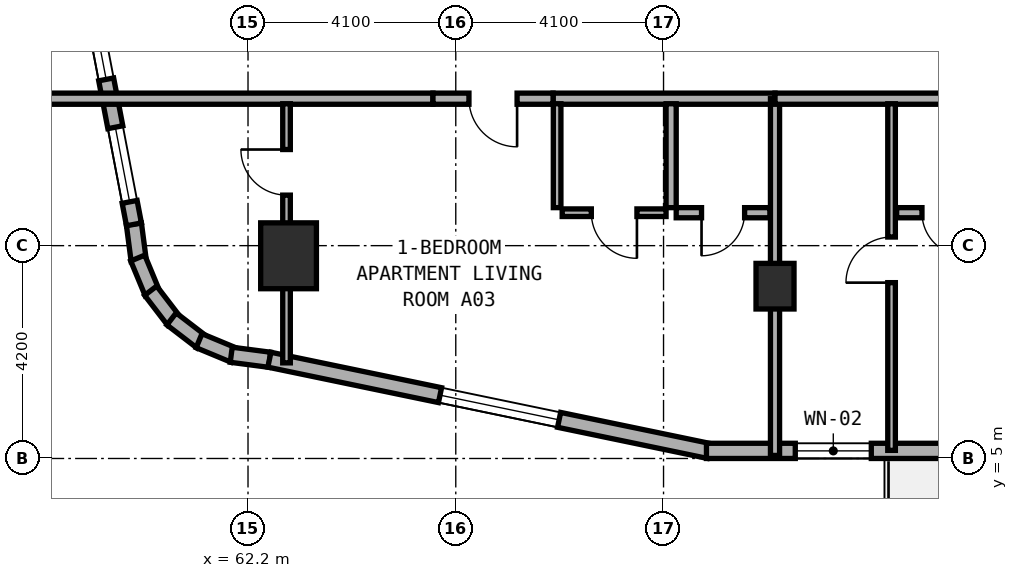
"""IFC4 building model, lengths in metres.
Left out: names, types, materials, properties, quantities, classifications, styles, units other than length and angle.
Written with IfcOpenShell. Run it as: python <this file> out.ifc"""

import sys

from ifc_helpers import new_model, si_unit, direction, frame, frame_2d, origin, origin_2d, place, context, subcontext, project, spatial, rectangle, extrude, element, fill, save


model = new_model("IFC4")
c1 = context("Model", 3, precision=1e-05, world=origin(), true_north=direction((0.0, 1.0)))
c2 = subcontext(c1, "Body", "Model", "MODEL_VIEW")
j1 = project(units=[si_unit("LENGTHUNIT", "METRE"), si_unit("PLANEANGLEUNIT", "RADIAN")], contexts=[c1])
p1 = place(None, origin())
s1 = spatial("IfcSite", under=j1, at=p1, CompositionType="ELEMENT")
p2 = place(p1, origin())
s2 = spatial("IfcBuilding", under=s1, at=p2, CompositionType="ELEMENT")
p3 = place(p2, frame((0.0, 0.0, 27.5)))
s3 = spatial("IfcBuildingStorey", under=s2, at=p3, CompositionType="ELEMENT", Elevation=27.5)
p4 = place(p3, frame((72.6, 8.4, 0.0), z_axis=(0.0, 0.0, 1.0), x_axis=(1.0, 0.0, 0.0)))
e1 = element("IfcColumn", 1, at=p4, inside=s3, PredefinedType="COLUMN", context=c2, shape_type="SweptSolid", body=[
    extrude(rectangle(XDim=0.75, YDim=0.9, at=origin_2d()), origin(), (0.0, 0.0, 1.0), 3.5),
])
p5 = place(p3, frame((63.0, 9.0, 0.0), z_axis=(0.0, 0.0, 1.0), x_axis=(1.0, 0.0, 0.0)))
e2 = element("IfcColumn", 2, at=p5, inside=s3, PredefinedType="COLUMN", context=c2, shape_type="SweptSolid", body=[
    extrude(rectangle(XDim=1.1, YDim=1.3, at=origin_2d()), origin(), (0.0, 0.0, 1.0), 3.5),
])
p6 = place(p3, frame((59.948, 9.627, 0.0), z_axis=(0.0, 0.0, 1.0), x_axis=(0.130255288807, -0.991480488834, 0.0)))
e3 = element("IfcWall", 3, at=p6, inside=s3, PredefinedType="STANDARD", context=c2, shape_type="SweptSolid", body=[
    extrude(rectangle(XDim=0.729, YDim=0.3, at=frame_2d((0.365, 0.0))), origin(), (0.0, 0.0, 1.0), 3.25),
])
for number, where, z_axis, x_axis in (
    (4, (60.024, 8.955, 0.0), (0.0, 0.0, 1.0), (0.384, -0.924, 0.0)),
    (5, (60.279, 8.311, 0.0), (0.0, 0.0, 1.0), (0.608, -0.794, 0.0)),
    (6, (60.691, 7.754, 0.0), (0.0, 0.0, 1.0), (0.794, -0.608, 0.0)),
    (7, (61.234, 7.324, 0.0), (0.0, 0.0, 1.0), (0.924, -0.383, 0.0)),
):
    element("IfcWall", number, at=place(p3, frame(where, z_axis=z_axis, x_axis=x_axis)), inside=s3, PredefinedType="STANDARD", context=c2, shape_type="SweptSolid", body=[
        extrude(rectangle(XDim=0.746, YDim=0.3, at=frame_2d((0.373, 0.0))), origin(), (0.0, 0.0, 1.0), 3.25),
    ])
p7 = place(p3, frame((61.869, 7.047, 0.0), z_axis=(0.0, 0.0, 1.0), x_axis=(0.991559404866, -0.129653178221, 0.0)))
e8 = element("IfcWall", 8, at=p7, inside=s3, PredefinedType="STANDARD", context=c2, shape_type="SweptSolid", body=[
    extrude(rectangle(XDim=0.764, YDim=0.3, at=frame_2d((0.382, 0.0))), origin(), (0.0, 0.0, 1.0), 3.25),
])
p8 = place(p3, frame((62.622, 6.949, 0.0), z_axis=(0.0, 0.0, 1.0), x_axis=(0.979119654102, -0.203284782882, 0.0)))
e9 = element("IfcWall", 9, at=p8, inside=s3, PredefinedType="STANDARD", context=c2, shape_type="SweptSolid", body=[
    extrude(rectangle(XDim=8.855, YDim=0.3, at=frame_2d((4.427, 0.0))), origin(), (0.0, 0.0, 1.0), 3.25),
])
p9 = place(p8, frame((3.439, 0.0, 0.8)))
e10 = element("IfcOpeningElement", 10, at=p9, cuts=e9, PredefinedType="OPENING", context=c2, shape_type="SweptSolid", body=[
    extrude(rectangle(XDim=2.4, YDim=1.6, at=frame_2d((1.2, 0.8))), frame((0.0, 0.16, 0.0), z_axis=(0.0, -1.0, 0.0), x_axis=(1.0, 0.0, 0.0)), (0.0, 0.0, 1.0), 0.32),
])
p10 = place(p3, frame((71.247, 5.15, 0.0), z_axis=(0.0, 0.0, 1.0), x_axis=(1.0, 0.0, 0.0)))
e11 = element("IfcWall", 11, at=p10, inside=s3, PredefinedType="STANDARD", context=c2, shape_type="SweptSolid", body=[
    extrude(rectangle(XDim=11.391, YDim=0.3, at=frame_2d((5.695, 0.0))), origin(), (0.0, 0.0, 1.0), 3.25),
])
p11 = place(p10, frame((5.113, 0.0, 0.0)))
e12 = element("IfcOpeningElement", 12, at=p11, cuts=e11, PredefinedType="OPENING", context=c2, shape_type="SweptSolid", body=[
    extrude(rectangle(XDim=1.2, YDim=2.15, at=frame_2d((0.6, 1.075))), frame((0.0, 0.16, 0.0), z_axis=(0.0, -1.0, 0.0), x_axis=(1.0, 0.0, 0.0)), (0.0, 0.0, 1.0), 0.32),
])
p12 = place(p10, frame((1.753, 0.0, 0.85)))
e13 = element("IfcOpeningElement", 13, at=p12, cuts=e11, PredefinedType="OPENING", context=c2, shape_type="SweptSolid", body=[
    extrude(rectangle(XDim=1.5, YDim=1.5, at=frame_2d((0.75, 0.75))), frame((0.0, 0.16, 0.0), z_axis=(0.0, -1.0, 0.0), x_axis=(1.0, 0.0, 0.0)), (0.0, 0.0, 1.0), 0.32),
])
p13 = place(p10, frame((7.757, 0.0, 0.8)))
e14 = element("IfcOpeningElement", 14, at=p13, cuts=e11, PredefinedType="OPENING", context=c2, shape_type="SweptSolid", body=[
    extrude(rectangle(XDim=2.4, YDim=1.6, at=frame_2d((1.2, 0.8))), frame((0.0, 0.16, 0.0), z_axis=(0.0, -1.0, 0.0), x_axis=(1.0, 0.0, 0.0)), (0.0, 0.0, 1.0), 0.32),
])
p14 = place(p3, frame((58.137, 19.082, 0.0), z_axis=(0.0, 0.0, 1.0), x_axis=(0.188087874316, -0.982152203854, 0.0)))
e15 = element("IfcWall", 15, at=p14, inside=s3, PredefinedType="STANDARD", context=c2, shape_type="SweptSolid", body=[
    extrude(rectangle(XDim=9.634, YDim=0.3, at=frame_2d((4.817, 0.0))), origin(), (0.0, 0.0, 1.0), 3.25),
])
p15 = place(p14, frame((1.306, 0.0, 0.8)))
e16 = element("IfcOpeningElement", 16, at=p15, cuts=e15, PredefinedType="OPENING", context=c2, shape_type="SweptSolid", body=[
    extrude(rectangle(XDim=2.4, YDim=1.6, at=frame_2d((1.2, 0.8))), frame((0.0, 0.16, 0.0), z_axis=(0.0, -1.0, 0.0), x_axis=(1.0, 0.0, 0.0)), (0.0, 0.0, 1.0), 0.32),
])
p16 = place(p14, frame((5.521, 0.0, 0.85)))
e17 = element("IfcOpeningElement", 17, at=p16, cuts=e15, PredefinedType="OPENING", context=c2, shape_type="SweptSolid", body=[
    extrude(rectangle(XDim=1.2, YDim=1.5, at=frame_2d((0.6, 0.75))), frame((0.0, 0.16, 0.0), z_axis=(0.0, -1.0, 0.0), x_axis=(1.0, 0.0, 0.0)), (0.0, 0.0, 1.0), 0.32),
])
p17 = place(p14, frame((7.682, 0.0, 0.85)))
e18 = element("IfcOpeningElement", 18, at=p17, cuts=e15, PredefinedType="OPENING", context=c2, shape_type="SweptSolid", body=[
    extrude(rectangle(XDim=1.5, YDim=1.5, at=frame_2d((0.75, 0.75))), frame((0.0, 0.16, 0.0), z_axis=(0.0, -1.0, 0.0), x_axis=(1.0, 0.0, 0.0)), (0.0, 0.0, 1.0), 0.32),
])
p18 = place(p3, frame((58.16, 12.1, 0.0), z_axis=(0.0, 0.0, 1.0), x_axis=(1.0, 0.0, 0.0)))
e19 = element("IfcWall", 19, at=p18, inside=s3, PredefinedType="SOLIDWALL", context=c2, shape_type="SweptSolid", body=[
    extrude(rectangle(XDim=7.69, YDim=0.22, at=frame_2d((3.845, 0.0))), origin(), (0.0, 0.0, 1.0), 2.865),
])
p19 = place(p3, frame((68.22, 12.1, 0.0), z_axis=(0.0, 0.0, 1.0), x_axis=(1.0, 0.0, 0.0)))
e20 = element("IfcWall", 20, at=p19, inside=s3, PredefinedType="SOLIDWALL", context=c2, shape_type="SweptSolid", body=[
    extrude(rectangle(XDim=4.38, YDim=0.22, at=frame_2d((2.19, 0.0))), origin(), (0.0, 0.0, 1.0), 2.725),
])
p20 = place(p3, frame((65.85, 12.1, 0.0), z_axis=(0.0, 0.0, 1.0), x_axis=(1.0, 0.0, 0.0)))
e21 = element("IfcWall", 21, at=p20, inside=s3, PredefinedType="SOLIDWALL", context=c2, shape_type="SweptSolid", body=[
    extrude(rectangle(XDim=2.37, YDim=0.22, at=frame_2d((1.185, 0.0))), origin(), (0.0, 0.0, 1.0), 3.22),
])
p21 = place(p20, frame((0.71, 0.0, 0.0)))
e22 = element("IfcOpeningElement", 22, at=p21, cuts=e21, PredefinedType="OPENING", context=c2, shape_type="SweptSolid", body=[
    extrude(rectangle(XDim=0.95, YDim=2.1, at=frame_2d((0.475, 1.05))), frame((0.0, 0.12, 0.0), z_axis=(0.0, -1.0, 0.0), x_axis=(1.0, 0.0, 0.0)), (0.0, 0.0, 1.0), 0.24),
])
p22 = place(p3, frame((62.96, 6.887, 0.0), z_axis=(0.0, 0.0, 1.0), x_axis=(0.0, 1.0, 0.0)))
e23 = element("IfcWall", 23, at=p22, inside=s3, PredefinedType="PARTITIONING", context=c2, shape_type="SweptSolid", body=[
    extrude(rectangle(XDim=5.113, YDim=0.15, at=frame_2d((2.557, 0.0))), origin(), (0.0, 0.0, 1.0), 2.865),
])
p23 = place(p22, frame((3.31, 0.0, 0.0)))
e24 = element("IfcOpeningElement", 24, at=p23, cuts=e23, PredefinedType="OPENING", context=c2, shape_type="SweptSolid", body=[
    extrude(rectangle(XDim=0.9, YDim=2.1, at=frame_2d((0.45, 1.05))), frame((0.0, 0.085, 0.0), z_axis=(0.0, -1.0, 0.0), x_axis=(1.0, 0.0, 0.0)), (0.0, 0.0, 1.0), 0.17),
])
p24 = place(p3, frame((70.55, 9.95, 0.0), z_axis=(0.0, 0.0, 1.0), x_axis=(0.0, 1.0, 0.0)))
e25 = element("IfcWall", 25, at=p24, inside=s3, PredefinedType="PLUMBINGWALL", context=c2, shape_type="SweptSolid", body=[
    extrude(rectangle(XDim=2.05, YDim=0.2, at=frame_2d((1.025, 0.0))), origin(), (0.0, 0.0, 1.0), 3.22),
])
p25 = place(p3, frame((68.3, 9.95, 0.0), z_axis=(0.0, 0.0, 1.0), x_axis=(0.0, 1.0, 0.0)))
e26 = element("IfcWall", 26, at=p25, inside=s3, PredefinedType="PARTITIONING", context=c2, shape_type="SweptSolid", body=[
    extrude(rectangle(XDim=2.05, YDim=0.15, at=frame_2d((1.025, 0.0))), origin(), (0.0, 0.0, 1.0), 3.22),
])
p26 = place(p3, frame((70.65, 9.85, 0.0), z_axis=(0.0, 0.0, 1.0), x_axis=(1.0, 0.0, 0.0)))
e27 = element("IfcWall", 27, at=p26, inside=s3, PredefinedType="PLUMBINGWALL", context=c2, shape_type="SweptSolid", body=[
    extrude(rectangle(XDim=1.85, YDim=0.2, at=frame_2d((0.925, 0.0))), origin(), (0.0, 0.0, 1.0), 3.22),
])
p27 = place(p26, frame((0.5, 0.0, 0.0)))
e28 = element("IfcOpeningElement", 28, at=p27, cuts=e27, PredefinedType="OPENING", context=c2, shape_type="SweptSolid", body=[
    extrude(rectangle(XDim=0.85, YDim=2.1, at=frame_2d((0.425, 1.05))), frame((0.0, 0.11, 0.0), z_axis=(0.0, -1.0, 0.0), x_axis=(1.0, 0.0, 0.0)), (0.0, 0.0, 1.0), 0.22),
])
p28 = place(p3, frame((68.4, 9.85, 0.0), z_axis=(0.0, 0.0, 1.0), x_axis=(1.0, 0.0, 0.0)))
e29 = element("IfcWall", 29, at=p28, inside=s3, PredefinedType="PARTITIONING", context=c2, shape_type="SweptSolid", body=[
    extrude(rectangle(XDim=2.05, YDim=0.15, at=frame_2d((1.025, 0.0))), origin(), (0.0, 0.0, 1.0), 3.22),
])
p29 = place(p28, frame((0.575, 0.0, 0.0)))
e30 = element("IfcOpeningElement", 30, at=p29, cuts=e29, PredefinedType="OPENING", context=c2, shape_type="SweptSolid", body=[
    extrude(rectangle(XDim=0.9, YDim=2.1, at=frame_2d((0.45, 1.05))), frame((0.0, 0.085, 0.0), z_axis=(0.0, -1.0, 0.0), x_axis=(1.0, 0.0, 0.0)), (0.0, 0.0, 1.0), 0.17),
])
p30 = place(p3, frame((72.6, 5.06, 0.0), z_axis=(0.0, 0.0, 1.0), x_axis=(0.0, 1.0, 0.0)))
e31 = element("IfcWall", 31, at=p30, inside=s3, PredefinedType="SOLIDWALL", context=c2, shape_type="SweptSolid", body=[
    extrude(rectangle(XDim=7.04, YDim=0.18, at=frame_2d((3.52, 0.0))), origin(), (0.0, 0.0, 1.0), 2.725),
])
p31 = place(p3, frame((72.6, 12.1, 0.0), z_axis=(0.0, 0.0, 1.0), x_axis=(1.0, 0.0, 0.0)))
e32 = element("IfcWall", 32, at=p31, inside=s3, PredefinedType="SOLIDWALL", context=c2, shape_type="SweptSolid", body=[
    extrude(rectangle(XDim=6.68, YDim=0.22, at=frame_2d((3.34, 0.0))), origin(), (0.0, 0.0, 1.0), 2.725),
])
p32 = place(p3, frame((74.9, 5.16, 0.0), z_axis=(0.0, 0.0, 1.0), x_axis=(0.0, 1.0, 0.0)))
e33 = element("IfcWall", 33, at=p32, inside=s3, PredefinedType="PARTITIONING", context=c2, shape_type="SweptSolid", body=[
    extrude(rectangle(XDim=6.84, YDim=0.15, at=frame_2d((3.42, 0.0))), origin(), (0.0, 0.0, 1.0), 2.775),
])
p33 = place(p32, frame((3.31, 0.0, 0.0)))
e34 = element("IfcOpeningElement", 34, at=p33, cuts=e33, PredefinedType="OPENING", context=c2, shape_type="SweptSolid", body=[
    extrude(rectangle(XDim=0.9, YDim=2.1, at=frame_2d((0.45, 1.05))), frame((0.0, 0.085, 0.0), z_axis=(0.0, -1.0, 0.0), x_axis=(1.0, 0.0, 0.0)), (0.0, 0.0, 1.0), 0.17),
])
p34 = place(p3, frame((75.0, 9.85, 0.0), z_axis=(0.0, 0.0, 1.0), x_axis=(1.0, 0.0, 0.0)))
e35 = element("IfcWall", 35, at=p34, inside=s3, PredefinedType="PLUMBINGWALL", context=c2, shape_type="SweptSolid", body=[
    extrude(rectangle(XDim=1.85, YDim=0.2, at=frame_2d((0.925, 0.0))), origin(), (0.0, 0.0, 1.0), 3.22),
])
p35 = place(p34, frame((0.5, 0.0, 0.0)))
e36 = element("IfcOpeningElement", 36, at=p35, cuts=e35, PredefinedType="OPENING", context=c2, shape_type="SweptSolid", body=[
    extrude(rectangle(XDim=0.85, YDim=2.1, at=frame_2d((0.425, 1.05))), frame((0.0, 0.11, 0.0), z_axis=(0.0, -1.0, 0.0), x_axis=(1.0, 0.0, 0.0)), (0.0, 0.0, 1.0), 0.22),
])
p36 = place(p9, origin())
e37 = element("IfcWindow", 37, at=p36, inside=s3, PartitioningType="SINGLE_PANEL", PredefinedType="WINDOW", context=c2, shape_type="SweptSolid", body=[
    extrude(rectangle(XDim=2.4, YDim=1.6, at=frame_2d((1.2, 0.8))), frame((0.0, 0.03, 0.0), z_axis=(0.0, -1.0, 0.0), x_axis=(1.0, 0.0, 0.0)), (0.0, 0.0, 1.0), 0.06),
])
fill(e10, e37)
p37 = place(p12, origin())
e38 = element("IfcWindow", 38, at=p37, inside=s3, PartitioningType="SINGLE_PANEL", PredefinedType="WINDOW", context=c2, shape_type="SweptSolid", body=[
    extrude(rectangle(XDim=1.5, YDim=1.5, at=frame_2d((0.75, 0.75))), frame((0.0, 0.03, 0.0), z_axis=(0.0, -1.0, 0.0), x_axis=(1.0, 0.0, 0.0)), (0.0, 0.0, 1.0), 0.06),
])
fill(e13, e38)
p38 = place(p16, origin())
e39 = element("IfcWindow", 39, at=p38, inside=s3, PartitioningType="SINGLE_PANEL", PredefinedType="WINDOW", context=c2, shape_type="SweptSolid", body=[
    extrude(rectangle(XDim=1.2, YDim=1.5, at=frame_2d((0.6, 0.75))), frame((0.0, 0.03, 0.0), z_axis=(0.0, -1.0, 0.0), x_axis=(1.0, 0.0, 0.0)), (0.0, 0.0, 1.0), 0.06),
])
fill(e17, e39)
p39 = place(p17, origin())
e40 = element("IfcWindow", 40, at=p39, inside=s3, PartitioningType="SINGLE_PANEL", PredefinedType="WINDOW", context=c2, shape_type="SweptSolid", body=[
    extrude(rectangle(XDim=1.5, YDim=1.5, at=frame_2d((0.75, 0.75))), frame((0.0, 0.03, 0.0), z_axis=(0.0, -1.0, 0.0), x_axis=(1.0, 0.0, 0.0)), (0.0, 0.0, 1.0), 0.06),
])
fill(e18, e40)
p40 = place(p21, frame((0.95, 0.0, 0.0), z_axis=(0.0, 0.0, 1.0), x_axis=(-1.0, 0.0, 0.0)))
e41 = element("IfcDoor", 41, at=p40, inside=s3, OperationType="SINGLE_SWING_LEFT", PredefinedType="DOOR", context=c2, shape_type="SweptSolid", body=[
    extrude(rectangle(XDim=0.95, YDim=2.1, at=frame_2d((0.475, 1.05))), frame((0.0, 0.025, 0.0), z_axis=(0.0, -1.0, 0.0), x_axis=(1.0, 0.0, 0.0)), (0.0, 0.0, 1.0), 0.05),
])
fill(e22, e41)
p41 = place(p23, origin())
e42 = element("IfcDoor", 42, at=p41, inside=s3, OperationType="SINGLE_SWING_RIGHT", PredefinedType="DOOR", context=c2, shape_type="SweptSolid", body=[
    extrude(rectangle(XDim=0.9, YDim=2.1, at=frame_2d((0.45, 1.05))), frame((0.0, 0.025, 0.0), z_axis=(0.0, -1.0, 0.0), x_axis=(1.0, 0.0, 0.0)), (0.0, 0.0, 1.0), 0.05),
])
fill(e24, e42)
p42 = place(p27, frame((0.85, 0.0, 0.0), z_axis=(0.0, 0.0, 1.0), x_axis=(-1.0, 0.0, 0.0)))
e43 = element("IfcDoor", 43, at=p42, inside=s3, OperationType="SINGLE_SWING_RIGHT", PredefinedType="DOOR", context=c2, shape_type="SweptSolid", body=[
    extrude(rectangle(XDim=0.85, YDim=2.1, at=frame_2d((0.425, 1.05))), frame((0.0, 0.025, 0.0), z_axis=(0.0, -1.0, 0.0), x_axis=(1.0, 0.0, 0.0)), (0.0, 0.0, 1.0), 0.05),
])
fill(e28, e43)
p43 = place(p29, frame((0.9, 0.0, 0.0), z_axis=(0.0, 0.0, 1.0), x_axis=(-1.0, 0.0, 0.0)))
e44 = element("IfcDoor", 44, at=p43, inside=s3, OperationType="SINGLE_SWING_LEFT", PredefinedType="DOOR", context=c2, shape_type="SweptSolid", body=[
    extrude(rectangle(XDim=0.9, YDim=2.1, at=frame_2d((0.45, 1.05))), frame((0.0, 0.025, 0.0), z_axis=(0.0, -1.0, 0.0), x_axis=(1.0, 0.0, 0.0)), (0.0, 0.0, 1.0), 0.05),
])
fill(e30, e44)
p44 = place(p33, origin())
e45 = element("IfcDoor", 45, at=p44, inside=s3, OperationType="SINGLE_SWING_LEFT", PredefinedType="DOOR", context=c2, shape_type="SweptSolid", body=[
    extrude(rectangle(XDim=0.9, YDim=2.1, at=frame_2d((0.45, 1.05))), frame((0.0, 0.025, 0.0), z_axis=(0.0, -1.0, 0.0), x_axis=(1.0, 0.0, 0.0)), (0.0, 0.0, 1.0), 0.05),
])
fill(e34, e45)
p45 = place(p35, frame((0.85, 0.0, 0.0), z_axis=(0.0, 0.0, 1.0), x_axis=(-1.0, 0.0, 0.0)))
e46 = element("IfcDoor", 46, at=p45, inside=s3, OperationType="SINGLE_SWING_LEFT", PredefinedType="DOOR", context=c2, shape_type="SweptSolid", body=[
    extrude(rectangle(XDim=0.85, YDim=2.1, at=frame_2d((0.425, 1.05))), frame((0.0, 0.025, 0.0), z_axis=(0.0, -1.0, 0.0), x_axis=(1.0, 0.0, 0.0)), (0.0, 0.0, 1.0), 0.05),
])
fill(e36, e46)
save(model, sys.argv[1])
